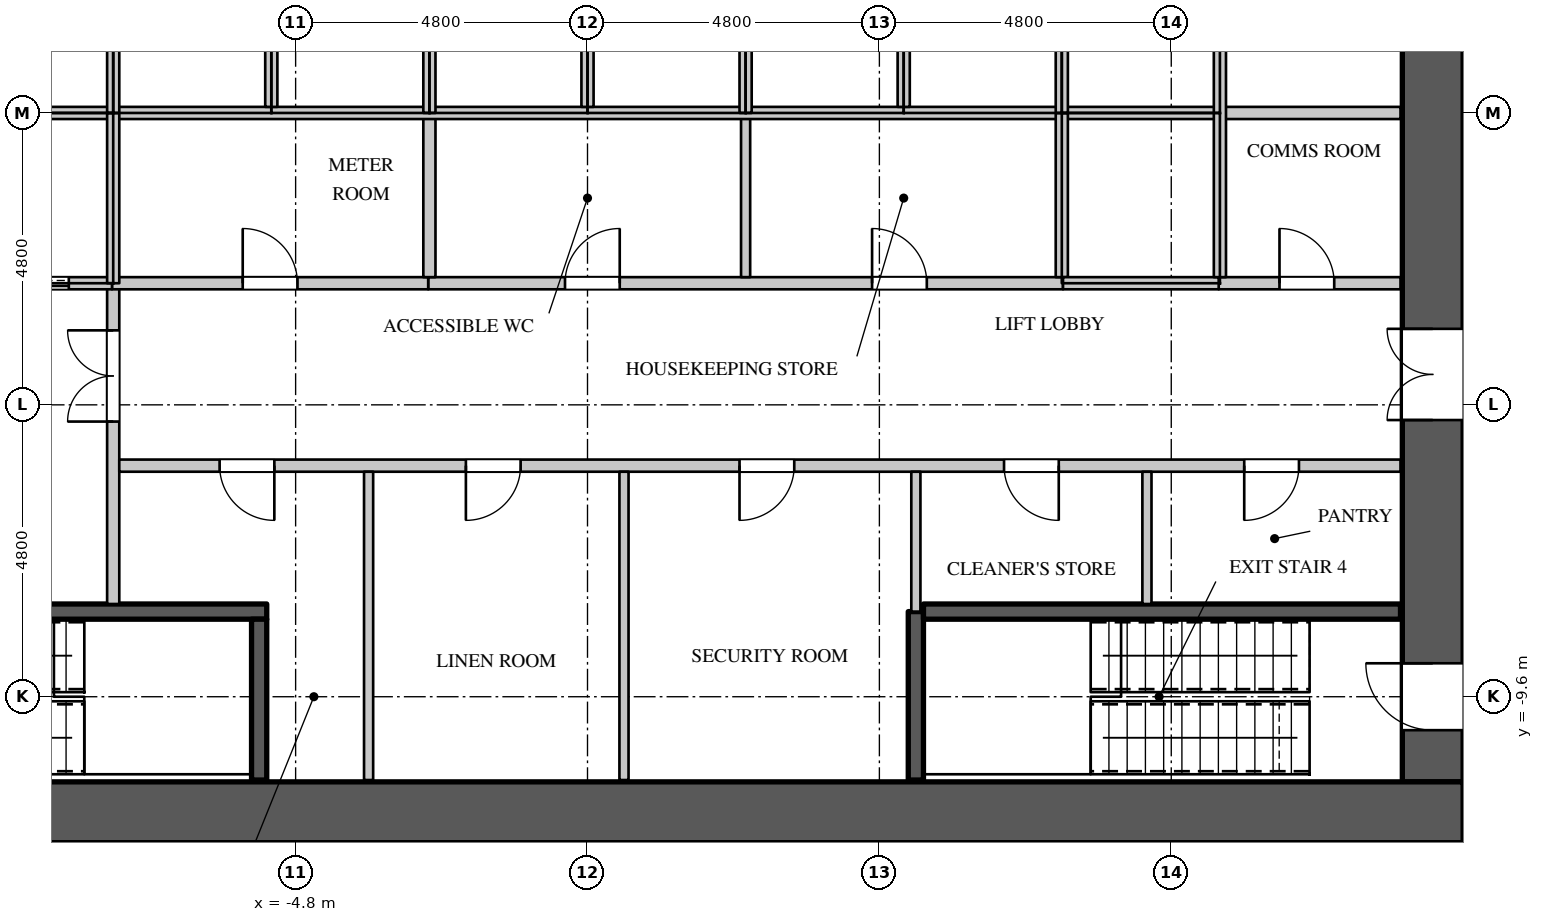
"""IFC4 building model, lengths in metres.
Left out: names, types, materials, properties, quantities, classifications, styles, units other than length and angle.
Written with IfcOpenShell. Run it as: python <this file> out.ifc"""

import sys

from ifc_helpers import new_model, si_unit, direction, frame, frame_2d, origin, place, context, subcontext, project, spatial, rectangle, extrude, element, fill, save


model = new_model("IFC4")
c1 = context("Model", 3, precision=1e-05, world=origin(), true_north=direction((0.0, 1.0)))
c2 = subcontext(c1, "Body", "Model", "MODEL_VIEW")
j1 = project(units=[si_unit("LENGTHUNIT", "METRE"), si_unit("PLANEANGLEUNIT", "RADIAN")], contexts=[c1])
p1 = place(None, origin())
s1 = spatial("IfcSite", under=j1, at=p1, CompositionType="ELEMENT")
p2 = place(p1, origin())
s2 = spatial("IfcBuilding", under=s1, at=p2, CompositionType="ELEMENT")
p3 = place(p2, frame((0.0, 0.0, 96.9)))
s3 = spatial("IfcBuildingStorey", under=s2, at=p3, CompositionType="ELEMENT", Elevation=96.9)
p4 = place(p3, frame((-14.4, -11.5, 0.0), z_axis=(0.0, 0.0, 1.0), x_axis=(1.0, 0.0, 0.0)))
e1 = element("IfcWall", 1, at=p4, inside=s3, PredefinedType="SHEAR", context=c2, shape_type="SweptSolid", body=[
    extrude(rectangle(XDim=28.8, YDim=1.0, at=frame_2d((14.4, 0.0))), origin(), (0.0, 0.0, 1.0), 4.2),
])
p5 = place(p3, frame((13.9, -11.0, 0.0), z_axis=(0.0, 0.0, 1.0), x_axis=(0.0, 1.0, 0.0)))
e2 = element("IfcWall", 2, at=p5, inside=s3, PredefinedType="SHEAR", context=c2, shape_type="SweptSolid", body=[
    extrude(rectangle(XDim=22.0, YDim=1.0, at=frame_2d((11.0, 0.0))), origin(), (0.0, 0.0, 1.0), 4.2),
])
p6 = place(p5, frame((20.05, 0.0, 0.0)))
e3 = element("IfcOpeningElement", 3, at=p6, cuts=e2, PredefinedType="OPENING", context=c2, shape_type="SweptSolid", body=[
    extrude(rectangle(XDim=1.1, YDim=2.2, at=frame_2d((0.55, 1.1))), frame((0.0, 0.51, 0.0), z_axis=(0.0, -1.0, 0.0), x_axis=(1.0, 0.0, 0.0)), (0.0, 0.0, 1.0), 1.02),
])
p7 = place(p5, frame((0.85, 0.0, 0.0)))
e4 = element("IfcOpeningElement", 4, at=p7, cuts=e2, PredefinedType="OPENING", context=c2, shape_type="SweptSolid", body=[
    extrude(rectangle(XDim=1.1, YDim=2.2, at=frame_2d((0.55, 1.1))), frame((0.0, 0.51, 0.0), z_axis=(0.0, -1.0, 0.0), x_axis=(1.0, 0.0, 0.0)), (0.0, 0.0, 1.0), 1.02),
])
p8 = place(p5, frame((14.55, 0.0, 0.0)))
e5 = element("IfcOpeningElement", 5, at=p8, cuts=e2, PredefinedType="OPENING", context=c2, shape_type="SweptSolid", body=[
    extrude(rectangle(XDim=1.5, YDim=2.4, at=frame_2d((0.75, 1.2))), frame((0.0, 0.51, 0.0), z_axis=(0.0, -1.0, 0.0), x_axis=(1.0, 0.0, 0.0)), (0.0, 0.0, 1.0), 1.02),
])
p9 = place(p5, frame((5.95, 0.0, 0.0)))
e6 = element("IfcOpeningElement", 6, at=p9, cuts=e2, PredefinedType="OPENING", context=c2, shape_type="SweptSolid", body=[
    extrude(rectangle(XDim=1.5, YDim=2.4, at=frame_2d((0.75, 1.2))), frame((0.0, 0.51, 0.0), z_axis=(0.0, -1.0, 0.0), x_axis=(1.0, 0.0, 0.0)), (0.0, 0.0, 1.0), 1.02),
])
p10 = place(p3, frame((-7.8, -8.075, 0.0), z_axis=(0.0, 0.0, 1.0), x_axis=(0.0, 1.0, 0.0)))
e7 = element("IfcWall", 7, at=p10, inside=s3, PredefinedType="PARTITIONING", context=c2, shape_type="SweptSolid", body=[
    extrude(rectangle(XDim=5.275, YDim=0.2, at=frame_2d((2.637, 0.0))), origin(), (0.0, 0.0, 1.0), 3.798),
])
p11 = place(p10, frame((3.0, 0.0, 0.0)))
e8 = element("IfcOpeningElement", 8, at=p11, cuts=e7, PredefinedType="OPENING", context=c2, shape_type="SweptSolid", body=[
    extrude(rectangle(XDim=1.5, YDim=2.4, at=frame_2d((0.75, 1.2))), frame((0.0, 0.11, 0.0), z_axis=(0.0, -1.0, 0.0), x_axis=(1.0, 0.0, 0.0)), (0.0, 0.0, 1.0), 0.22),
])
p12 = place(p3, frame((-7.7, -5.8, 0.0), z_axis=(0.0, 0.0, 1.0), x_axis=(1.0, 0.0, 0.0)))
e9 = element("IfcWall", 9, at=p12, inside=s3, PredefinedType="PARTITIONING", context=c2, shape_type="SweptSolid", body=[
    extrude(rectangle(XDim=21.07, YDim=0.2, at=frame_2d((10.535, 0.0))), origin(), (0.0, 0.0, 1.0), 3.798),
])
p13 = place(p12, frame((1.65, 0.0, 0.0)))
e10 = element("IfcOpeningElement", 10, at=p13, cuts=e9, PredefinedType="OPENING", context=c2, shape_type="SweptSolid", body=[
    extrude(rectangle(XDim=0.9, YDim=2.2, at=frame_2d((0.45, 1.1))), frame((0.0, 0.11, 0.0), z_axis=(0.0, -1.0, 0.0), x_axis=(1.0, 0.0, 0.0)), (0.0, 0.0, 1.0), 0.22),
])
p14 = place(p12, frame((5.7, 0.0, 0.0)))
e11 = element("IfcOpeningElement", 11, at=p14, cuts=e9, PredefinedType="OPENING", context=c2, shape_type="SweptSolid", body=[
    extrude(rectangle(XDim=0.9, YDim=2.2, at=frame_2d((0.45, 1.1))), frame((0.0, 0.11, 0.0), z_axis=(0.0, -1.0, 0.0), x_axis=(1.0, 0.0, 0.0)), (0.0, 0.0, 1.0), 0.22),
])
p15 = place(p12, frame((10.2, 0.0, 0.0)))
e12 = element("IfcOpeningElement", 12, at=p15, cuts=e9, PredefinedType="OPENING", context=c2, shape_type="SweptSolid", body=[
    extrude(rectangle(XDim=0.9, YDim=2.2, at=frame_2d((0.45, 1.1))), frame((0.0, 0.11, 0.0), z_axis=(0.0, -1.0, 0.0), x_axis=(1.0, 0.0, 0.0)), (0.0, 0.0, 1.0), 0.22),
])
p16 = place(p12, frame((14.55, 0.0, 0.0)))
e13 = element("IfcOpeningElement", 13, at=p16, cuts=e9, PredefinedType="OPENING", context=c2, shape_type="SweptSolid", body=[
    extrude(rectangle(XDim=0.9, YDim=2.2, at=frame_2d((0.45, 1.1))), frame((0.0, 0.11, 0.0), z_axis=(0.0, -1.0, 0.0), x_axis=(1.0, 0.0, 0.0)), (0.0, 0.0, 1.0), 0.22),
])
p17 = place(p12, frame((18.5, 0.0, 0.0)))
e14 = element("IfcOpeningElement", 14, at=p17, cuts=e9, PredefinedType="OPENING", context=c2, shape_type="SweptSolid", body=[
    extrude(rectangle(XDim=0.9, YDim=2.2, at=frame_2d((0.45, 1.1))), frame((0.0, 0.11, 0.0), z_axis=(0.0, -1.0, 0.0), x_axis=(1.0, 0.0, 0.0)), (0.0, 0.0, 1.0), 0.22),
])
p18 = place(p3, frame((-2.62, -2.8, 0.0), z_axis=(0.0, 0.0, 1.0), x_axis=(1.0, 0.0, 0.0)))
e15 = element("IfcWall", 15, at=p18, inside=s3, PredefinedType="PARTITIONING", context=c2, shape_type="SweptSolid", body=[
    extrude(rectangle(XDim=10.44, YDim=0.2, at=frame_2d((5.22, 0.0))), origin(), (0.0, 0.0, 1.0), 3.798),
])
p19 = place(p18, frame((2.25, 0.0, 0.0)))
e16 = element("IfcOpeningElement", 16, at=p19, cuts=e15, PredefinedType="OPENING", context=c2, shape_type="SweptSolid", body=[
    extrude(rectangle(XDim=0.9, YDim=2.2, at=frame_2d((0.45, 1.1))), frame((0.0, 0.11, 0.0), z_axis=(0.0, -1.0, 0.0), x_axis=(1.0, 0.0, 0.0)), (0.0, 0.0, 1.0), 0.22),
])
p20 = place(p18, frame((7.3, 0.0, 0.0)))
e17 = element("IfcOpeningElement", 17, at=p20, cuts=e15, PredefinedType="OPENING", context=c2, shape_type="SweptSolid", body=[
    extrude(rectangle(XDim=0.9, YDim=2.2, at=frame_2d((0.45, 1.1))), frame((0.0, 0.11, 0.0), z_axis=(0.0, -1.0, 0.0), x_axis=(1.0, 0.0, 0.0)), (0.0, 0.0, 1.0), 0.22),
])
for number, where, z_axis, x_axis in (
    (18, (-3.6, -10.97, 0.0), (0.0, 0.0, 1.0), (0.0, 1.0, 0.0)),
    (19, (0.6, -10.97, 0.0), (0.0, 0.0, 1.0), (0.0, 1.0, 0.0)),
):
    element("IfcWall", number, at=place(p3, frame(where, z_axis=z_axis, x_axis=x_axis)), inside=s3, PredefinedType="PARTITIONING", context=c2, shape_type="SweptSolid", body=[
        extrude(rectangle(XDim=5.07, YDim=0.15, at=frame_2d((2.535, 0.0))), origin(), (0.0, 0.0, 1.0), 3.798),
    ])
p21 = place(p3, frame((2.6, -2.7, 0.0), z_axis=(0.0, 0.0, 1.0), x_axis=(0.0, 1.0, 0.0)))
e20 = element("IfcWall", 20, at=p21, inside=s3, PredefinedType="PARTITIONING", context=c2, shape_type="SweptSolid", body=[
    extrude(rectangle(XDim=2.7, YDim=0.15, at=frame_2d((1.35, 0.0))), origin(), (0.0, 0.0, 1.0), 3.798),
])
p22 = place(p3, frame((5.4, -8.2, 0.0), z_axis=(0.0, 0.0, 1.0), x_axis=(0.0, 1.0, 0.0)))
e21 = element("IfcWall", 21, at=p22, inside=s3, PredefinedType="PARTITIONING", context=c2, shape_type="SweptSolid", body=[
    extrude(rectangle(XDim=2.3, YDim=0.15, at=frame_2d((1.15, 0.0))), origin(), (0.0, 0.0, 1.0), 3.798),
])
p23 = place(p3, frame((9.2, -8.075, 0.0), z_axis=(0.0, 0.0, 1.0), x_axis=(0.0, 1.0, 0.0)))
e22 = element("IfcWall", 22, at=p23, inside=s3, PredefinedType="PARTITIONING", context=c2, shape_type="SweptSolid", body=[
    extrude(rectangle(XDim=2.175, YDim=0.15, at=frame_2d((1.087, 0.0))), origin(), (0.0, 0.0, 1.0), 3.798),
])
p24 = place(p3, frame((-7.82, -2.8, 0.0), z_axis=(0.0, 0.0, 1.0), x_axis=(1.0, 0.0, 0.0)))
e23 = element("IfcWall", 23, at=p24, inside=s3, PredefinedType="PARTITIONING", context=c2, shape_type="SweptSolid", body=[
    extrude(rectangle(XDim=5.2, YDim=0.2, at=frame_2d((2.6, 0.0))), origin(), (0.0, 0.0, 1.0), 3.798),
])
p25 = place(p24, frame((2.15, 0.0, 0.0)))
e24 = element("IfcOpeningElement", 24, at=p25, cuts=e23, PredefinedType="OPENING", context=c2, shape_type="SweptSolid", body=[
    extrude(rectangle(XDim=0.9, YDim=2.2, at=frame_2d((0.45, 1.1))), frame((0.0, 0.11, 0.0), z_axis=(0.0, -1.0, 0.0), x_axis=(1.0, 0.0, 0.0)), (0.0, 0.0, 1.0), 0.22),
])
p26 = place(p3, frame((-2.6, -2.7, 0.0), z_axis=(0.0, 0.0, 1.0), x_axis=(0.0, 1.0, 0.0)))
e25 = element("IfcWall", 25, at=p26, inside=s3, PredefinedType="PARTITIONING", context=c2, shape_type="SweptSolid", body=[
    extrude(rectangle(XDim=2.7, YDim=0.2, at=frame_2d((1.35, 0.0))), origin(), (0.0, 0.0, 1.0), 3.798),
])
p27 = place(p3, frame((10.38, -2.8, 0.0), z_axis=(0.0, 0.0, 1.0), x_axis=(1.0, 0.0, 0.0)))
e26 = element("IfcWall", 26, at=p27, inside=s3, PredefinedType="PARTITIONING", context=c2, shape_type="SweptSolid", body=[
    extrude(rectangle(XDim=2.99, YDim=0.2, at=frame_2d((1.495, 0.0))), origin(), (0.0, 0.0, 1.0), 3.798),
])
p28 = place(p27, frame((1.0, 0.0, 0.0)))
e27 = element("IfcOpeningElement", 27, at=p28, cuts=e26, PredefinedType="OPENING", context=c2, shape_type="SweptSolid", body=[
    extrude(rectangle(XDim=0.9, YDim=2.2, at=frame_2d((0.45, 1.1))), frame((0.0, 0.11, 0.0), z_axis=(0.0, -1.0, 0.0), x_axis=(1.0, 0.0, 0.0)), (0.0, 0.0, 1.0), 0.22),
])
p29 = place(p3, frame((10.4, 0.0, 0.0), z_axis=(0.0, 0.0, 1.0), x_axis=(1.0, 0.0, 0.0)))
e28 = element("IfcWall", 28, at=p29, inside=s3, PredefinedType="PARTITIONING", context=c2, shape_type="SweptSolid", body=[
    extrude(rectangle(XDim=2.97, YDim=0.2, at=frame_2d((1.485, 0.0))), origin(), (0.0, 0.0, 1.0), 3.798),
])
p30 = place(p3, frame((-13.37, 0.0, 0.0), z_axis=(0.0, 0.0, 1.0), x_axis=(1.0, 0.0, 0.0)))
e29 = element("IfcWall", 29, at=p30, inside=s3, PredefinedType="PARTITIONING", context=c2, shape_type="SweptSolid", body=[
    extrude(rectangle(XDim=23.77, YDim=0.2, at=frame_2d((11.885, 0.0))), origin(), (0.0, 0.0, 1.0), 3.798),
])
p31 = place(p3, frame((-10.38, -2.8, 0.0), z_axis=(0.0, 0.0, 1.0), x_axis=(1.0, 0.0, 0.0)))
e30 = element("IfcWall", 30, at=p31, inside=s3, PredefinedType="PARTITIONING", context=c2, shape_type="SweptSolid", body=[
    extrude(rectangle(XDim=2.56, YDim=0.2, at=frame_2d((1.28, 0.0))), origin(), (0.0, 0.0, 1.0), 3.798),
])
p32 = place(p31, frame((0.75, 0.0, 0.0)))
e31 = element("IfcOpeningElement", 31, at=p32, cuts=e30, PredefinedType="OPENING", context=c2, shape_type="SweptSolid", body=[
    extrude(rectangle(XDim=1.1, YDim=2.2, at=frame_2d((0.55, 1.1))), frame((0.0, 0.11, 0.0), z_axis=(0.0, -1.0, 0.0), x_axis=(1.0, 0.0, 0.0)), (0.0, 0.0, 1.0), 0.22),
])
for number, where, z_axis, x_axis in (
    (32, (-7.8, -2.8, 0.0), (0.0, 0.0, 1.0), (0.0, 1.0, 0.0)),
    (33, (-7.8, 0.0, 0.0), (0.0, 0.0, 1.0), (0.0, 1.0, 0.0)),
):
    element("IfcWall", number, at=place(p3, frame(where, z_axis=z_axis, x_axis=x_axis)), inside=s3, PredefinedType="PARTITIONING", context=c2, shape_type="SweptSolid", body=[
        extrude(rectangle(XDim=2.8, YDim=0.2, at=frame_2d((1.4, 0.0))), origin(), (0.0, 0.0, 1.0), 3.798),
    ])
p33 = place(p3, frame((-5.2, 0.1, 0.0), z_axis=(0.0, 0.0, 1.0), x_axis=(0.0, 1.0, 0.0)))
e34 = element("IfcWall", 34, at=p33, inside=s3, PredefinedType="PARTITIONING", context=c2, shape_type="SweptSolid", body=[
    extrude(rectangle(XDim=2.6, YDim=0.2, at=frame_2d((1.3, 0.0))), origin(), (0.0, 0.0, 1.0), 3.798),
])
p34 = place(p3, frame((-2.6, 0.0, 0.0), z_axis=(0.0, 0.0, 1.0), x_axis=(0.0, 1.0, 0.0)))
e35 = element("IfcWall", 35, at=p34, inside=s3, PredefinedType="PARTITIONING", context=c2, shape_type="SweptSolid", body=[
    extrude(rectangle(XDim=2.7, YDim=0.2, at=frame_2d((1.35, 0.0))), origin(), (0.0, 0.0, 1.0), 3.798),
])
p35 = place(p3, frame((0.0, 0.1, 0.0), z_axis=(0.0, 0.0, 1.0), x_axis=(0.0, 1.0, 0.0)))
e36 = element("IfcWall", 36, at=p35, inside=s3, PredefinedType="PARTITIONING", context=c2, shape_type="SweptSolid", body=[
    extrude(rectangle(XDim=2.6, YDim=0.2, at=frame_2d((1.3, 0.0))), origin(), (0.0, 0.0, 1.0), 3.798),
])
p36 = place(p3, frame((2.6, 0.0, 0.0), z_axis=(0.0, 0.0, 1.0), x_axis=(0.0, 1.0, 0.0)))
e37 = element("IfcWall", 37, at=p36, inside=s3, PredefinedType="PARTITIONING", context=c2, shape_type="SweptSolid", body=[
    extrude(rectangle(XDim=2.7, YDim=0.2, at=frame_2d((1.35, 0.0))), origin(), (0.0, 0.0, 1.0), 3.798),
])
p37 = place(p3, frame((5.2, 0.1, 0.0), z_axis=(0.0, 0.0, 1.0), x_axis=(0.0, 1.0, 0.0)))
e38 = element("IfcWall", 38, at=p37, inside=s3, PredefinedType="PARTITIONING", context=c2, shape_type="SweptSolid", body=[
    extrude(rectangle(XDim=2.6, YDim=0.2, at=frame_2d((1.3, 0.0))), origin(), (0.0, 0.0, 1.0), 3.798),
])
p38 = place(p3, frame((7.8, -2.7, 0.0), z_axis=(0.0, 0.0, 1.0), x_axis=(0.0, 1.0, 0.0)))
e39 = element("IfcWall", 39, at=p38, inside=s3, PredefinedType="PARTITIONING", context=c2, shape_type="SweptSolid", body=[
    extrude(rectangle(XDim=2.7, YDim=0.2, at=frame_2d((1.35, 0.0))), origin(), (0.0, 0.0, 1.0), 3.798),
])
p39 = place(p3, frame((7.82, -2.8, 0.0), z_axis=(0.0, 0.0, 1.0), x_axis=(1.0, 0.0, 0.0)))
e40 = element("IfcWall", 40, at=p39, inside=s3, PredefinedType="PARTITIONING", context=c2, shape_type="SweptSolid", body=[
    extrude(rectangle(XDim=2.56, YDim=0.2, at=frame_2d((1.28, 0.0))), origin(), (0.0, 0.0, 1.0), 3.798),
])
p40 = place(p3, frame((7.8, 0.0, 0.0), z_axis=(0.0, 0.0, 1.0), x_axis=(0.0, 1.0, 0.0)))
e41 = element("IfcWall", 41, at=p40, inside=s3, PredefinedType="PARTITIONING", context=c2, shape_type="SweptSolid", body=[
    extrude(rectangle(XDim=2.7, YDim=0.2, at=frame_2d((1.35, 0.0))), origin(), (0.0, 0.0, 1.0), 3.798),
])
p41 = place(p3, frame((10.4, -2.7, 0.0), z_axis=(0.0, 0.0, 1.0), x_axis=(0.0, 1.0, 0.0)))
e42 = element("IfcWall", 42, at=p41, inside=s3, PredefinedType="PARTITIONING", context=c2, shape_type="SweptSolid", body=[
    extrude(rectangle(XDim=5.4, YDim=0.2, at=frame_2d((2.7, 0.0))), origin(), (0.0, 0.0, 1.0), 3.798),
])
p42 = place(p3, frame((-13.37, -8.2, 0.0), z_axis=(0.0, 0.0, 1.0), x_axis=(1.0, 0.0, 0.0)))
e43 = element("IfcWall", 43, at=p42, inside=s3, PredefinedType="SHEAR", context=c2, shape_type="SweptSolid", body=[
    extrude(rectangle(XDim=8.095, YDim=0.25, at=frame_2d((4.048, 0.0))), origin(), (0.0, 0.0, 1.0), 3.798),
])
p43 = place(p42, frame((0.15, 0.0, 0.0)))
e44 = element("IfcOpeningElement", 44, at=p43, cuts=e43, PredefinedType="OPENING", context=c2, shape_type="SweptSolid", body=[
    extrude(rectangle(XDim=1.1, YDim=2.2, at=frame_2d((0.55, 1.1))), frame((0.0, 0.135, 0.0), z_axis=(0.0, -1.0, 0.0), x_axis=(1.0, 0.0, 0.0)), (0.0, 0.0, 1.0), 0.27),
])
p44 = place(p3, frame((-5.4, -10.97, 0.0), z_axis=(0.0, 0.0, 1.0), x_axis=(0.0, 1.0, 0.0)))
e45 = element("IfcWall", 45, at=p44, inside=s3, PredefinedType="SHEAR", context=c2, shape_type="SweptSolid", body=[
    extrude(rectangle(XDim=2.645, YDim=0.25, at=frame_2d((1.323, 0.0))), origin(), (0.0, 0.0, 1.0), 3.798),
])
p45 = place(p3, frame((5.4, -10.97, 0.0), z_axis=(0.0, 0.0, 1.0), x_axis=(0.0, 1.0, 0.0)))
e46 = element("IfcWall", 46, at=p45, inside=s3, PredefinedType="SHEAR", context=c2, shape_type="SweptSolid", body=[
    extrude(rectangle(XDim=2.77, YDim=0.25, at=frame_2d((1.385, 0.0))), origin(), (0.0, 0.0, 1.0), 3.798),
])
p46 = place(p3, frame((5.525, -8.2, 0.0), z_axis=(0.0, 0.0, 1.0), x_axis=(1.0, 0.0, 0.0)))
e47 = element("IfcWall", 47, at=p46, inside=s3, PredefinedType="SHEAR", context=c2, shape_type="SweptSolid", body=[
    extrude(rectangle(XDim=7.845, YDim=0.25, at=frame_2d((3.923, 0.0))), origin(), (0.0, 0.0, 1.0), 3.798),
])
p47 = place(p28, origin())
e48 = element("IfcDoor", 48, at=p47, inside=s3, OperationType="SINGLE_SWING_LEFT", PredefinedType="DOOR", context=c2, shape_type="SweptSolid", body=[
    extrude(rectangle(XDim=0.9, YDim=2.2, at=frame_2d((0.45, 1.1))), frame((0.0, 0.025, 0.0), z_axis=(0.0, -1.0, 0.0), x_axis=(1.0, 0.0, 0.0)), (0.0, 0.0, 1.0), 0.05),
])
fill(e27, e48)
p48 = place(p13, origin())
e49 = element("IfcDoor", 49, at=p48, inside=s3, OperationType="SINGLE_SWING_LEFT", PredefinedType="DOOR", context=c2, shape_type="SweptSolid", body=[
    extrude(rectangle(XDim=0.9, YDim=2.2, at=frame_2d((0.45, 1.1))), frame((0.0, 0.025, 0.0), z_axis=(0.0, -1.0, 0.0), x_axis=(1.0, 0.0, 0.0)), (0.0, 0.0, 1.0), 0.05),
])
fill(e10, e49)
p49 = place(p14, origin())
e50 = element("IfcDoor", 50, at=p49, inside=s3, OperationType="SINGLE_SWING_RIGHT", PredefinedType="DOOR", context=c2, shape_type="SweptSolid", body=[
    extrude(rectangle(XDim=0.9, YDim=2.2, at=frame_2d((0.45, 1.1))), frame((0.0, 0.025, 0.0), z_axis=(0.0, -1.0, 0.0), x_axis=(1.0, 0.0, 0.0)), (0.0, 0.0, 1.0), 0.05),
])
fill(e11, e50)
p50 = place(p15, origin())
e51 = element("IfcDoor", 51, at=p50, inside=s3, OperationType="SINGLE_SWING_RIGHT", PredefinedType="DOOR", context=c2, shape_type="SweptSolid", body=[
    extrude(rectangle(XDim=0.9, YDim=2.2, at=frame_2d((0.45, 1.1))), frame((0.0, 0.025, 0.0), z_axis=(0.0, -1.0, 0.0), x_axis=(1.0, 0.0, 0.0)), (0.0, 0.0, 1.0), 0.05),
])
fill(e12, e51)
p51 = place(p16, origin())
e52 = element("IfcDoor", 52, at=p51, inside=s3, OperationType="SINGLE_SWING_LEFT", PredefinedType="DOOR", context=c2, shape_type="SweptSolid", body=[
    extrude(rectangle(XDim=0.9, YDim=2.2, at=frame_2d((0.45, 1.1))), frame((0.0, 0.025, 0.0), z_axis=(0.0, -1.0, 0.0), x_axis=(1.0, 0.0, 0.0)), (0.0, 0.0, 1.0), 0.05),
])
fill(e13, e52)
p52 = place(p17, origin())
e53 = element("IfcDoor", 53, at=p52, inside=s3, OperationType="SINGLE_SWING_RIGHT", PredefinedType="DOOR", context=c2, shape_type="SweptSolid", body=[
    extrude(rectangle(XDim=0.9, YDim=2.2, at=frame_2d((0.45, 1.1))), frame((0.0, 0.025, 0.0), z_axis=(0.0, -1.0, 0.0), x_axis=(1.0, 0.0, 0.0)), (0.0, 0.0, 1.0), 0.05),
])
fill(e14, e53)
p53 = place(p25, origin())
e54 = element("IfcDoor", 54, at=p53, inside=s3, OperationType="SINGLE_SWING_LEFT", PredefinedType="DOOR", context=c2, shape_type="SweptSolid", body=[
    extrude(rectangle(XDim=0.9, YDim=2.2, at=frame_2d((0.45, 1.1))), frame((0.0, 0.025, 0.0), z_axis=(0.0, -1.0, 0.0), x_axis=(1.0, 0.0, 0.0)), (0.0, 0.0, 1.0), 0.05),
])
fill(e24, e54)
p54 = place(p19, origin())
e55 = element("IfcDoor", 55, at=p54, inside=s3, OperationType="SINGLE_SWING_RIGHT", PredefinedType="DOOR", context=c2, shape_type="SweptSolid", body=[
    extrude(rectangle(XDim=0.9, YDim=2.2, at=frame_2d((0.45, 1.1))), frame((0.0, 0.025, 0.0), z_axis=(0.0, -1.0, 0.0), x_axis=(1.0, 0.0, 0.0)), (0.0, 0.0, 1.0), 0.05),
])
fill(e16, e55)
p55 = place(p20, origin())
e56 = element("IfcDoor", 56, at=p55, inside=s3, OperationType="SINGLE_SWING_LEFT", PredefinedType="DOOR", context=c2, shape_type="SweptSolid", body=[
    extrude(rectangle(XDim=0.9, YDim=2.2, at=frame_2d((0.45, 1.1))), frame((0.0, 0.025, 0.0), z_axis=(0.0, -1.0, 0.0), x_axis=(1.0, 0.0, 0.0)), (0.0, 0.0, 1.0), 0.05),
])
fill(e17, e56)
p56 = place(p32, origin())
e57 = element("IfcDoor", 57, at=p56, inside=s3, OperationType="DOUBLE_DOOR_SLIDING", PredefinedType="DOOR", context=c2, shape_type="SweptSolid", body=[
    extrude(rectangle(XDim=1.1, YDim=2.2, at=frame_2d((0.55, 1.1))), frame((0.0, 0.025, 0.0), z_axis=(0.0, -1.0, 0.0), x_axis=(1.0, 0.0, 0.0)), (0.0, 0.0, 1.0), 0.05),
])
fill(e31, e57)
p57 = place(p11, origin())
e58 = element("IfcDoor", 58, at=p57, inside=s3, OperationType="DOUBLE_DOOR_SINGLE_SWING", PredefinedType="DOOR", context=c2, shape_type="SweptSolid", body=[
    extrude(rectangle(XDim=1.5, YDim=2.4, at=frame_2d((0.75, 1.2))), frame((0.0, 0.025, 0.0), z_axis=(0.0, -1.0, 0.0), x_axis=(1.0, 0.0, 0.0)), (0.0, 0.0, 1.0), 0.05),
])
fill(e8, e58)
p58 = place(p7, origin())
e59 = element("IfcDoor", 59, at=p58, inside=s3, OperationType="SINGLE_SWING_RIGHT", PredefinedType="DOOR", context=c2, shape_type="SweptSolid", body=[
    extrude(rectangle(XDim=1.1, YDim=2.2, at=frame_2d((0.55, 1.1))), frame((0.0, 0.495, 0.0), z_axis=(0.0, -1.0, 0.0), x_axis=(1.0, 0.0, 0.0)), (0.0, 0.0, 1.0), 0.05),
])
fill(e4, e59)
p59 = place(p9, origin())
e60 = element("IfcDoor", 60, at=p59, inside=s3, OperationType="DOUBLE_DOOR_SINGLE_SWING", PredefinedType="DOOR", context=c2, shape_type="SweptSolid", body=[
    extrude(rectangle(XDim=1.5, YDim=2.4, at=frame_2d((0.75, 1.2))), frame((0.0, 0.495, 0.0), z_axis=(0.0, -1.0, 0.0), x_axis=(1.0, 0.0, 0.0)), (0.0, 0.0, 1.0), 0.05),
])
fill(e6, e60)
save(model, sys.argv[1])
